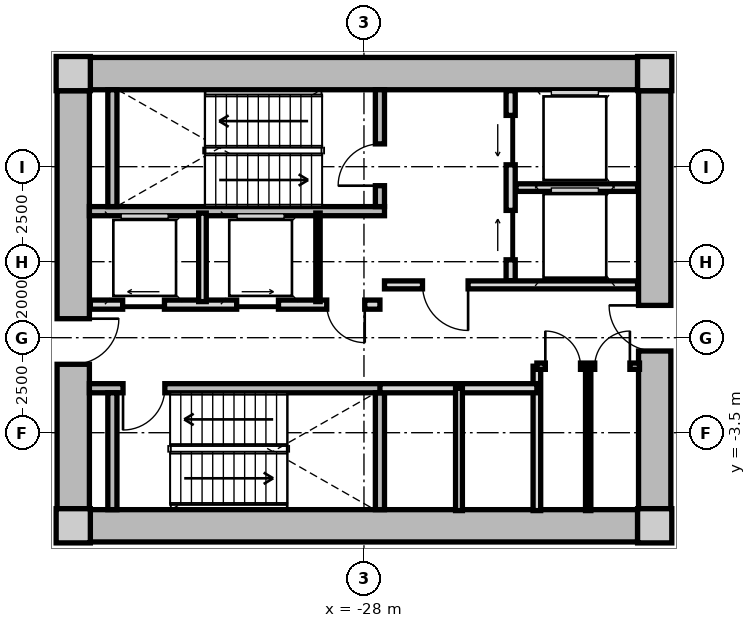
"""IFC4 building model, lengths in metres.
Left out: names, types, materials, properties, quantities, classifications, styles, units other than length and angle.
Written with IfcOpenShell. Run it as: python <this file> out.ifc"""

import sys

from ifc_helpers import new_model, si_unit, direction, frame, frame_2d, origin, origin_2d, place, context, subcontext, project, spatial, rectangle, extrude, source, transform, mapped, element, fill, save


model = new_model("IFC4")
c1 = context("Model", 3, precision=1e-05, world=origin(), true_north=direction((0.0, 1.0)))
c2 = subcontext(c1, "Body", "Model", "MODEL_VIEW")
j1 = project(units=[si_unit("LENGTHUNIT", "METRE"), si_unit("PLANEANGLEUNIT", "RADIAN")], contexts=[c1])
p1 = place(None, origin())
s1 = spatial("IfcSite", under=j1, at=p1, CompositionType="ELEMENT")
p2 = place(p1, origin())
s2 = spatial("IfcBuilding", under=s1, at=p2, CompositionType="ELEMENT")
p3 = place(p2, frame((0.0, 0.0, 8.4)))
s3 = spatial("IfcBuildingStorey", under=s2, at=p3, CompositionType="ELEMENT", Elevation=8.4)
m1 = source(origin(), c2, "Body", "SweptSolid", [
    extrude(rectangle(XDim=0.9, YDim=0.9, at=origin_2d()), origin(), (0.0, 0.0, 1.0), 4.2),
])
for number, where, z_axis, x_axis in (
    (1, (-35.65, -5.95, 0.0), (0.0, 0.0, 1.0), (1.0, 0.0, 0.0)),
    (2, (-20.35, -5.95, 0.0), (0.0, 0.0, 1.0), (1.0, 0.0, 0.0)),
    (3, (-20.35, 5.95, 0.0), (0.0, 0.0, 1.0), (1.0, 0.0, 0.0)),
    (4, (-35.65, 5.95, 0.0), (0.0, 0.0, 1.0), (1.0, 0.0, 0.0)),
):
    element("IfcColumn", number, at=place(p3, frame(where, z_axis=z_axis, x_axis=x_axis)), inside=s3, PredefinedType="COLUMN", context=c2, shape_type="MappedRepresentation", body=[
        mapped(m1, transform((0.0, 0.0, 0.0), x_axis=(1.0, 0.0, 0.0), y_axis=(0.0, 1.0, 0.0), z_axis=(0.0, 0.0, 1.0), scale=1.0)),
    ])
m2 = source(origin(), c2, "Body", "SweptSolid", [
    extrude(rectangle(XDim=14.4, YDim=0.85, at=frame_2d((7.2, 0.0))), origin(), (0.0, 0.0, 1.0), 3.88),
])
for number, where, z_axis, x_axis in (
    (5, (-35.2, 5.95, 0.0), (0.0, 0.0, 1.0), (1.0, 0.0, 0.0)),
    (6, (-20.8, -5.95, 0.0), (0.0, 0.0, 1.0), (-1.0, 0.0, 0.0)),
):
    element("IfcWall", number, at=place(p3, frame(where, z_axis=z_axis, x_axis=x_axis)), inside=s3, PredefinedType="SHEAR", context=c2, shape_type="MappedRepresentation", body=[
        mapped(m2, transform((0.0, 0.0, 0.0), x_axis=(1.0, 0.0, 0.0), y_axis=(0.0, 1.0, 0.0), z_axis=(0.0, 0.0, 1.0), scale=1.0)),
    ])
m3 = source(origin(), c2, "Body", "SweptSolid", [
    extrude(rectangle(XDim=11.0, YDim=0.85, at=frame_2d((5.5, 0.0))), origin(), (0.0, 0.0, 1.0), 3.88),
])
p4 = place(p3, frame((-35.65, -5.5, 0.0), z_axis=(0.0, 0.0, 1.0), x_axis=(0.0, 1.0, 0.0)))
e7 = element("IfcWall", 7, at=p4, inside=s3, PredefinedType="SHEAR", context=c2, shape_type="MappedRepresentation", body=[
    mapped(m3, transform((0.0, 0.0, 0.0), x_axis=(1.0, 0.0, 0.0), y_axis=(0.0, 1.0, 0.0), z_axis=(0.0, 0.0, 1.0), scale=1.0)),
])
p5 = place(p4, frame((3.8, 0.0, 0.0)))
e8 = element("IfcOpeningElement", 8, at=p5, cuts=e7, PredefinedType="OPENING", context=c2, shape_type="SweptSolid", body=[
    extrude(rectangle(XDim=1.2, YDim=2.15, at=frame_2d((0.6, 1.075))), frame((0.0, 0.435, 0.0), z_axis=(0.0, -1.0, 0.0), x_axis=(1.0, 0.0, 0.0)), (0.0, 0.0, 1.0), 0.87),
])
p6 = place(p3, frame((-20.35, 5.5, 0.0), z_axis=(0.0, 0.0, 1.0), x_axis=(0.0, -1.0, 0.0)))
e9 = element("IfcWall", 9, at=p6, inside=s3, PredefinedType="SHEAR", context=c2, shape_type="MappedRepresentation", body=[
    mapped(m3, transform((0.0, 0.0, 0.0), x_axis=(1.0, 0.0, 0.0), y_axis=(0.0, 1.0, 0.0), z_axis=(0.0, 0.0, 1.0), scale=1.0)),
])
p7 = place(p6, frame((5.65, 0.0, 0.0)))
e10 = element("IfcOpeningElement", 10, at=p7, cuts=e9, PredefinedType="OPENING", context=c2, shape_type="SweptSolid", body=[
    extrude(rectangle(XDim=1.2, YDim=2.15, at=frame_2d((0.6, 1.075))), frame((0.0, 0.435, 0.0), z_axis=(0.0, -1.0, 0.0), x_axis=(1.0, 0.0, 0.0)), (0.0, 0.0, 1.0), 0.87),
])
m4 = source(origin(), c2, "Body", "SweptSolid", [
    extrude(rectangle(XDim=7.765, YDim=0.24, at=frame_2d((3.883, 0.0))), origin(), (0.0, 0.0, 1.0), 3.88),
])
p8 = place(p3, frame((-35.225, 2.33, 0.0), z_axis=(0.0, 0.0, 1.0), x_axis=(1.0, 0.0, 0.0)))
e11 = element("IfcWall", 11, at=p8, inside=s3, PredefinedType="PARTITIONING", context=c2, shape_type="MappedRepresentation", body=[
    mapped(m4, transform((0.0, 0.0, 0.0), x_axis=(1.0, 0.0, 0.0), y_axis=(0.0, 1.0, 0.0), z_axis=(0.0, 0.0, 1.0), scale=1.0)),
])
m5 = source(origin(), c2, "Body", "SweptSolid", [
    extrude(rectangle(XDim=3.075, YDim=0.24, at=frame_2d((1.538, 0.0))), origin(), (0.0, 0.0, 1.0), 3.88),
])
p9 = place(p3, frame((-34.62, 2.45, 0.0), z_axis=(0.0, 0.0, 1.0), x_axis=(0.0, 1.0, 0.0)))
e12 = element("IfcWall", 12, at=p9, inside=s3, PredefinedType="PARTITIONING", context=c2, shape_type="MappedRepresentation", body=[
    mapped(m5, transform((0.0, 0.0, 0.0), x_axis=(1.0, 0.0, 0.0), y_axis=(0.0, 1.0, 0.0), z_axis=(0.0, 0.0, 1.0), scale=1.0)),
])
p10 = place(p3, frame((-27.58, 2.45, 0.0), z_axis=(0.0, 0.0, 1.0), x_axis=(0.0, 1.0, 0.0)))
e13 = element("IfcWall", 13, at=p10, inside=s3, PredefinedType="PARTITIONING", context=c2, shape_type="MappedRepresentation", body=[
    mapped(m5, transform((0.0, 0.0, 0.0), x_axis=(1.0, 0.0, 0.0), y_axis=(0.0, 1.0, 0.0), z_axis=(0.0, 0.0, 1.0), scale=1.0)),
])
p11 = place(p10, frame((0.55, 0.0, 0.0)))
e14 = element("IfcOpeningElement", 14, at=p11, cuts=e13, PredefinedType="OPENING", context=c2, shape_type="SweptSolid", body=[
    extrude(rectangle(XDim=1.1, YDim=2.15, at=frame_2d((0.55, 1.075))), frame((0.0, 0.13, 0.0), z_axis=(0.0, -1.0, 0.0), x_axis=(1.0, 0.0, 0.0)), (0.0, 0.0, 1.0), 0.26),
])
p12 = place(p3, frame((-35.225, -2.33, 0.0), z_axis=(0.0, 0.0, 1.0), x_axis=(1.0, 0.0, 0.0)))
e15 = element("IfcWall", 15, at=p12, inside=s3, PredefinedType="PARTITIONING", context=c2, shape_type="MappedRepresentation", body=[
    mapped(m4, transform((0.0, 0.0, 0.0), x_axis=(1.0, 0.0, 0.0), y_axis=(0.0, 1.0, 0.0), z_axis=(0.0, 0.0, 1.0), scale=1.0)),
])
p13 = place(p12, frame((0.885, 0.0, 0.0)))
e16 = element("IfcOpeningElement", 16, at=p13, cuts=e15, PredefinedType="OPENING", context=c2, shape_type="SweptSolid", body=[
    extrude(rectangle(XDim=1.1, YDim=2.15, at=frame_2d((0.55, 1.075))), frame((0.0, 0.13, 0.0), z_axis=(0.0, -1.0, 0.0), x_axis=(1.0, 0.0, 0.0)), (0.0, 0.0, 1.0), 0.26),
])
for number, where, z_axis, x_axis in (
    (17, (-34.62, -5.525, 0.0), (0.0, 0.0, 1.0), (0.0, 1.0, 0.0)),
    (18, (-27.58, -5.525, 0.0), (0.0, 0.0, 1.0), (0.0, 1.0, 0.0)),
):
    element("IfcWall", number, at=place(p3, frame(where, z_axis=z_axis, x_axis=x_axis)), inside=s3, PredefinedType="PARTITIONING", context=c2, shape_type="MappedRepresentation", body=[
        mapped(m5, transform((0.0, 0.0, 0.0), x_axis=(1.0, 0.0, 0.0), y_axis=(0.0, 1.0, 0.0), z_axis=(0.0, 0.0, 1.0), scale=1.0)),
    ])
m6 = source(origin(), c2, "Body", "SweptSolid", [
    extrude(rectangle(XDim=5.0, YDim=0.24, at=frame_2d((2.5, 0.0))), origin(), (0.0, 0.0, 1.0), 3.865),
])
p14 = place(p3, frame((-24.14, 0.5, 0.0), z_axis=(0.0, 0.0, 1.0), x_axis=(0.0, 1.0, 0.0)))
e19 = element("IfcWall", 19, at=p14, inside=s3, PredefinedType="PARTITIONING", context=c2, shape_type="MappedRepresentation", body=[
    mapped(m6, transform((0.0, 0.0, 0.0), x_axis=(1.0, 0.0, 0.0), y_axis=(0.0, 1.0, 0.0), z_axis=(0.0, 0.0, 1.0), scale=1.0)),
])
p15 = place(p14, frame((3.05, 0.0, 0.0)))
e20 = element("IfcOpeningElement", 20, at=p15, cuts=e19, PredefinedType="OPENING", context=c2, shape_type="SweptSolid", body=[
    extrude(rectangle(XDim=1.3, YDim=2.2, at=frame_2d((0.65, 1.1))), frame((0.0, 0.13, 0.0), z_axis=(0.0, -1.0, 0.0), x_axis=(1.0, 0.0, 0.0)), (0.0, 0.0, 1.0), 0.26),
])
p16 = place(p14, frame((0.55, 0.0, 0.0)))
e21 = element("IfcOpeningElement", 21, at=p16, cuts=e19, PredefinedType="OPENING", context=c2, shape_type="SweptSolid", body=[
    extrude(rectangle(XDim=1.3, YDim=2.2, at=frame_2d((0.65, 1.1))), frame((0.0, 0.13, 0.0), z_axis=(0.0, -1.0, 0.0), x_axis=(1.0, 0.0, 0.0)), (0.0, 0.0, 1.0), 0.26),
])
m7 = source(origin(), c2, "Body", "SweptSolid", [
    extrude(rectangle(XDim=3.2, YDim=0.2, at=frame_2d((1.6, 0.0))), origin(), (0.0, 0.0, 1.0), 3.865),
])
p17 = place(p3, frame((-24.0, 2.95, 0.0), z_axis=(0.0, 0.0, 1.0), x_axis=(1.0, 0.0, 0.0)))
e22 = element("IfcWall", 22, at=p17, inside=s3, PredefinedType="PARTITIONING", context=c2, shape_type="MappedRepresentation", body=[
    mapped(m7, transform((0.0, 0.0, 0.0), x_axis=(1.0, 0.0, 0.0), y_axis=(0.0, 1.0, 0.0), z_axis=(0.0, 0.0, 1.0), scale=1.0)),
])
m8 = source(origin(), c2, "Body", "SweptSolid", [
    extrude(rectangle(XDim=6.66, YDim=0.21, at=frame_2d((3.33, 0.0))), origin(), (0.0, 0.0, 1.0), 3.865),
])
p18 = place(p3, frame((-27.46, 0.39, 0.0), z_axis=(0.0, 0.0, 1.0), x_axis=(1.0, 0.0, 0.0)))
e23 = element("IfcWall", 23, at=p18, inside=s3, PredefinedType="PARTITIONING", context=c2, shape_type="MappedRepresentation", body=[
    mapped(m8, transform((0.0, 0.0, 0.0), x_axis=(1.0, 0.0, 0.0), y_axis=(0.0, 1.0, 0.0), z_axis=(0.0, 0.0, 1.0), scale=1.0)),
])
p19 = place(p18, frame((1.0, 0.0, 0.0)))
e24 = element("IfcOpeningElement", 24, at=p19, cuts=e23, PredefinedType="OPENING", context=c2, shape_type="SweptSolid", body=[
    extrude(rectangle(XDim=1.2, YDim=2.15, at=frame_2d((0.6, 1.075))), frame((0.0, 0.115, 0.0), z_axis=(0.0, -1.0, 0.0), x_axis=(1.0, 0.0, 0.0)), (0.0, 0.0, 1.0), 0.23),
])
m9 = source(origin(), c2, "Body", "SweptSolid", [
    extrude(rectangle(XDim=7.62, YDim=0.24, at=frame_2d((3.81, 0.0))), origin(), (0.0, 0.0, 1.0), 3.865),
])
p20 = place(p3, frame((-35.2, -0.13, 0.0), z_axis=(0.0, 0.0, 1.0), x_axis=(1.0, 0.0, 0.0)))
e25 = element("IfcWall", 25, at=p20, inside=s3, PredefinedType="PARTITIONING", context=c2, shape_type="MappedRepresentation", body=[
    mapped(m9, transform((0.0, 0.0, 0.0), x_axis=(1.0, 0.0, 0.0), y_axis=(0.0, 1.0, 0.0), z_axis=(0.0, 0.0, 1.0), scale=1.0)),
])
p21 = place(p20, frame((6.22, 0.0, 0.0)))
e26 = element("IfcOpeningElement", 26, at=p21, cuts=e25, PredefinedType="OPENING", context=c2, shape_type="SweptSolid", body=[
    extrude(rectangle(XDim=1.0, YDim=2.1, at=frame_2d((0.5, 1.05))), frame((0.0, 0.13, 0.0), z_axis=(0.0, -1.0, 0.0), x_axis=(1.0, 0.0, 0.0)), (0.0, 0.0, 1.0), 0.26),
])
p22 = place(p20, frame((0.85, 0.0, 0.0)))
e27 = element("IfcOpeningElement", 27, at=p22, cuts=e25, PredefinedType="OPENING", context=c2, shape_type="SweptSolid", body=[
    extrude(rectangle(XDim=1.1, YDim=2.2, at=frame_2d((0.55, 1.1))), frame((0.0, 0.13, 0.0), z_axis=(0.0, -1.0, 0.0), x_axis=(1.0, 0.0, 0.0)), (0.0, 0.0, 1.0), 0.26),
])
p23 = place(p20, frame((3.85, 0.0, 0.0)))
e28 = element("IfcOpeningElement", 28, at=p23, cuts=e25, PredefinedType="OPENING", context=c2, shape_type="SweptSolid", body=[
    extrude(rectangle(XDim=1.1, YDim=2.2, at=frame_2d((0.55, 1.1))), frame((0.0, 0.13, 0.0), z_axis=(0.0, -1.0, 0.0), x_axis=(1.0, 0.0, 0.0)), (0.0, 0.0, 1.0), 0.26),
])
m10 = source(origin(), c2, "Body", "SweptSolid", [
    extrude(rectangle(XDim=2.33, YDim=0.115, at=frame_2d((1.165, 0.0))), origin(), (0.0, 0.0, 1.0), 3.865),
])
p24 = place(p3, frame((-29.21, -0.05, 0.0), z_axis=(0.0, 0.0, 1.0), x_axis=(0.0, 1.0, 0.0)))
e29 = element("IfcWall", 29, at=p24, inside=s3, PredefinedType="PARTITIONING", context=c2, shape_type="MappedRepresentation", body=[
    mapped(m10, transform((0.0, 0.0, 0.0), x_axis=(1.0, 0.0, 0.0), y_axis=(0.0, 1.0, 0.0), z_axis=(0.0, 0.0, 1.0), scale=1.0)),
])
m11 = source(origin(), c2, "Body", "SweptSolid", [
    extrude(rectangle(XDim=2.33, YDim=0.2, at=frame_2d((1.165, 0.0))), origin(), (0.0, 0.0, 1.0), 3.865),
])
p25 = place(p3, frame((-32.25, -0.05, 0.0), z_axis=(0.0, 0.0, 1.0), x_axis=(0.0, 1.0, 0.0)))
e30 = element("IfcWall", 30, at=p25, inside=s3, PredefinedType="PARTITIONING", context=c2, shape_type="MappedRepresentation", body=[
    mapped(m11, transform((0.0, 0.0, 0.0), x_axis=(1.0, 0.0, 0.0), y_axis=(0.0, 1.0, 0.0), z_axis=(0.0, 0.0, 1.0), scale=1.0)),
])
m12 = source(origin(), c2, "Body", "SweptSolid", [
    extrude(rectangle(XDim=3.8, YDim=0.2, at=frame_2d((1.9, 0.0))), origin(), (0.0, 0.0, 1.0), 3.865),
])
p26 = place(p3, frame((-23.45, -5.55, 0.0), z_axis=(0.0, 0.0, 1.0), x_axis=(0.0, 1.0, 0.0)))
e31 = element("IfcWall", 31, at=p26, inside=s3, PredefinedType="PARTITIONING", context=c2, shape_type="MappedRepresentation", body=[
    mapped(m12, transform((0.0, 0.0, 0.0), x_axis=(1.0, 0.0, 0.0), y_axis=(0.0, 1.0, 0.0), z_axis=(0.0, 0.0, 1.0), scale=1.0)),
])
m13 = source(origin(), c2, "Body", "SweptSolid", [
    extrude(rectangle(XDim=4.13, YDim=0.24, at=frame_2d((2.065, 0.0))), origin(), (0.0, 0.0, 1.0), 3.865),
])
p27 = place(p3, frame((-27.58, -2.33, 0.0), z_axis=(0.0, 0.0, 1.0), x_axis=(1.0, 0.0, 0.0)))
e32 = element("IfcWall", 32, at=p27, inside=s3, PredefinedType="PARTITIONING", context=c2, shape_type="MappedRepresentation", body=[
    mapped(m13, transform((0.0, 0.0, 0.0), x_axis=(1.0, 0.0, 0.0), y_axis=(0.0, 1.0, 0.0), z_axis=(0.0, 0.0, 1.0), scale=1.0)),
])
m14 = source(origin(), c2, "Body", "SweptSolid", [
    extrude(rectangle(XDim=3.22, YDim=0.18, at=frame_2d((1.61, 0.0))), origin(), (0.0, 0.0, 1.0), 3.865),
])
p28 = place(p3, frame((-25.5, -5.55, 0.0), z_axis=(0.0, 0.0, 1.0), x_axis=(0.0, 1.0, 0.0)))
e33 = element("IfcWall", 33, at=p28, inside=s3, PredefinedType="PARTITIONING", context=c2, shape_type="MappedRepresentation", body=[
    mapped(m14, transform((0.0, 0.0, 0.0), x_axis=(1.0, 0.0, 0.0), y_axis=(0.0, 1.0, 0.0), z_axis=(0.0, 0.0, 1.0), scale=1.0)),
])
m15 = source(origin(), c2, "Body", "SweptSolid", [
    extrude(rectangle(XDim=2.7, YDim=0.165, at=frame_2d((1.35, 0.0))), origin(), (0.0, 0.0, 1.0), 3.865),
])
p29 = place(p3, frame((-23.45, -1.75, 0.0), z_axis=(0.0, 0.0, 1.0), x_axis=(1.0, 0.0, 0.0)))
e34 = element("IfcWall", 34, at=p29, inside=s3, PredefinedType="PARTITIONING", context=c2, shape_type="MappedRepresentation", body=[
    mapped(m15, transform((0.0, 0.0, 0.0), x_axis=(1.0, 0.0, 0.0), y_axis=(0.0, 1.0, 0.0), z_axis=(0.0, 0.0, 1.0), scale=1.0)),
])
p30 = place(p29, frame((0.222, 0.0, 0.0)))
e35 = element("IfcOpeningElement", 35, at=p30, cuts=e34, PredefinedType="OPENING", context=c2, shape_type="SweptSolid", body=[
    extrude(rectangle(XDim=0.925, YDim=2.1, at=frame_2d((0.462, 1.05))), frame((0.0, 0.093, 0.0), z_axis=(0.0, -1.0, 0.0), x_axis=(1.0, 0.0, 0.0)), (0.0, 0.0, 1.0), 0.185),
])
p31 = place(p29, frame((1.522, 0.0, 0.0)))
e36 = element("IfcOpeningElement", 36, at=p31, cuts=e34, PredefinedType="OPENING", context=c2, shape_type="SweptSolid", body=[
    extrude(rectangle(XDim=0.925, YDim=2.1, at=frame_2d((0.462, 1.05))), frame((0.0, 0.093, 0.0), z_axis=(0.0, -1.0, 0.0), x_axis=(1.0, 0.0, 0.0)), (0.0, 0.0, 1.0), 0.185),
])
m16 = source(origin(), c2, "Body", "SweptSolid", [
    extrude(rectangle(XDim=3.8, YDim=0.14, at=frame_2d((1.9, 0.0))), origin(), (0.0, 0.0, 1.0), 3.865),
])
p32 = place(p3, frame((-22.1, -5.55, 0.0), z_axis=(0.0, 0.0, 1.0), x_axis=(0.0, 1.0, 0.0)))
e37 = element("IfcWall", 37, at=p32, inside=s3, PredefinedType="PARTITIONING", context=c2, shape_type="MappedRepresentation", body=[
    mapped(m16, transform((0.0, 0.0, 0.0), x_axis=(1.0, 0.0, 0.0), y_axis=(0.0, 1.0, 0.0), z_axis=(0.0, 0.0, 1.0), scale=1.0)),
])
m17 = source(origin(), c2, "Body", "SweptSolid", [
    extrude(rectangle(XDim=1.1, YDim=2.15, at=frame_2d((0.55, 1.075))), frame((0.0, 0.025, 0.0), z_axis=(0.0, -1.0, 0.0), x_axis=(1.0, 0.0, 0.0)), (0.0, 0.0, 1.0), 0.05),
])
p33 = place(p11, origin())
e38 = element("IfcDoor", 38, at=p33, inside=s3, OperationType="SINGLE_SWING_LEFT", PredefinedType="DOOR", context=c2, shape_type="MappedRepresentation", body=[
    mapped(m17, transform((0.0, 0.0, 0.0), x_axis=(1.0, 0.0, 0.0), y_axis=(0.0, 1.0, 0.0), z_axis=(0.0, 0.0, 1.0), scale=1.0)),
])
fill(e14, e38)
p34 = place(p13, frame((1.1, 0.0, 0.0), z_axis=(0.0, 0.0, 1.0), x_axis=(-1.0, 0.0, 0.0)))
e39 = element("IfcDoor", 39, at=p34, inside=s3, OperationType="SINGLE_SWING_RIGHT", PredefinedType="DOOR", context=c2, shape_type="MappedRepresentation", body=[
    mapped(m17, transform((0.0, 0.0, 0.0), x_axis=(1.0, 0.0, 0.0), y_axis=(0.0, 1.0, 0.0), z_axis=(0.0, 0.0, 1.0), scale=1.0)),
])
fill(e16, e39)
m18 = source(origin(), c2, "Body", "SweptSolid", [
    extrude(rectangle(XDim=1.3, YDim=2.2, at=frame_2d((0.65, 1.1))), frame((0.0, 0.025, 0.0), z_axis=(0.0, -1.0, 0.0), x_axis=(1.0, 0.0, 0.0)), (0.0, 0.0, 1.0), 0.05),
])
p35 = place(p15, origin())
e40 = element("IfcDoor", 40, at=p35, inside=s3, OperationType="SLIDING_TO_LEFT", PredefinedType="DOOR", context=c2, shape_type="MappedRepresentation", body=[
    mapped(m18, transform((0.0, 0.0, 0.0), x_axis=(1.0, 0.0, 0.0), y_axis=(0.0, 1.0, 0.0), z_axis=(0.0, 0.0, 1.0), scale=1.0)),
])
fill(e20, e40)
p36 = place(p16, origin())
e41 = element("IfcDoor", 41, at=p36, inside=s3, OperationType="SLIDING_TO_RIGHT", PredefinedType="DOOR", context=c2, shape_type="MappedRepresentation", body=[
    mapped(m18, transform((0.0, 0.0, 0.0), x_axis=(1.0, 0.0, 0.0), y_axis=(0.0, 1.0, 0.0), z_axis=(0.0, 0.0, 1.0), scale=1.0)),
])
fill(e21, e41)
m19 = source(origin(), c2, "Body", "SweptSolid", [
    extrude(rectangle(XDim=1.2, YDim=2.15, at=frame_2d((0.6, 1.075))), frame((0.0, 0.025, 0.0), z_axis=(0.0, -1.0, 0.0), x_axis=(1.0, 0.0, 0.0)), (0.0, 0.0, 1.0), 0.05),
])
p37 = place(p19, frame((1.2, 0.0, 0.0), z_axis=(0.0, 0.0, 1.0), x_axis=(-1.0, 0.0, 0.0)))
e42 = element("IfcDoor", 42, at=p37, inside=s3, OperationType="SINGLE_SWING_LEFT", PredefinedType="DOOR", context=c2, shape_type="MappedRepresentation", body=[
    mapped(m19, transform((0.0, 0.0, 0.0), x_axis=(1.0, 0.0, 0.0), y_axis=(0.0, 1.0, 0.0), z_axis=(0.0, 0.0, 1.0), scale=1.0)),
])
fill(e24, e42)
p38 = place(p5, frame((1.2, 0.0, 0.0), z_axis=(0.0, 0.0, 1.0), x_axis=(-1.0, 0.0, 0.0)))
e43 = element("IfcDoor", 43, at=p38, inside=s3, OperationType="SINGLE_SWING_LEFT", PredefinedType="DOOR", context=c2, shape_type="MappedRepresentation", body=[
    mapped(m19, transform((0.0, 0.0, 0.0), x_axis=(1.0, 0.0, 0.0), y_axis=(0.0, 1.0, 0.0), z_axis=(0.0, 0.0, 1.0), scale=1.0)),
])
fill(e8, e43)
p39 = place(p7, frame((1.2, 0.0, 0.0), z_axis=(0.0, 0.0, 1.0), x_axis=(-1.0, 0.0, 0.0)))
e44 = element("IfcDoor", 44, at=p39, inside=s3, OperationType="SINGLE_SWING_RIGHT", PredefinedType="DOOR", context=c2, shape_type="MappedRepresentation", body=[
    mapped(m19, transform((0.0, 0.0, 0.0), x_axis=(1.0, 0.0, 0.0), y_axis=(0.0, 1.0, 0.0), z_axis=(0.0, 0.0, 1.0), scale=1.0)),
])
fill(e10, e44)
m20 = source(origin(), c2, "Body", "SweptSolid", [
    extrude(rectangle(XDim=1.0, YDim=2.1, at=frame_2d((0.5, 1.05))), frame((0.0, 0.025, 0.0), z_axis=(0.0, -1.0, 0.0), x_axis=(1.0, 0.0, 0.0)), (0.0, 0.0, 1.0), 0.05),
])
p40 = place(p21, frame((1.0, 0.0, 0.0), z_axis=(0.0, 0.0, 1.0), x_axis=(-1.0, 0.0, 0.0)))
e45 = element("IfcDoor", 45, at=p40, inside=s3, OperationType="SINGLE_SWING_LEFT", PredefinedType="DOOR", context=c2, shape_type="MappedRepresentation", body=[
    mapped(m20, transform((0.0, 0.0, 0.0), x_axis=(1.0, 0.0, 0.0), y_axis=(0.0, 1.0, 0.0), z_axis=(0.0, 0.0, 1.0), scale=1.0)),
])
fill(e26, e45)
m21 = source(origin(), c2, "Body", "SweptSolid", [
    extrude(rectangle(XDim=1.1, YDim=2.2, at=frame_2d((0.55, 1.1))), frame((0.0, 0.025, 0.0), z_axis=(0.0, -1.0, 0.0), x_axis=(1.0, 0.0, 0.0)), (0.0, 0.0, 1.0), 0.05),
])
p41 = place(p22, origin())
e46 = element("IfcDoor", 46, at=p41, inside=s3, OperationType="SLIDING_TO_LEFT", PredefinedType="DOOR", context=c2, shape_type="MappedRepresentation", body=[
    mapped(m21, transform((0.0, 0.0, 0.0), x_axis=(1.0, 0.0, 0.0), y_axis=(0.0, 1.0, 0.0), z_axis=(0.0, 0.0, 1.0), scale=1.0)),
])
fill(e27, e46)
p42 = place(p23, origin())
e47 = element("IfcDoor", 47, at=p42, inside=s3, OperationType="SLIDING_TO_RIGHT", PredefinedType="DOOR", context=c2, shape_type="MappedRepresentation", body=[
    mapped(m21, transform((0.0, 0.0, 0.0), x_axis=(1.0, 0.0, 0.0), y_axis=(0.0, 1.0, 0.0), z_axis=(0.0, 0.0, 1.0), scale=1.0)),
])
fill(e28, e47)
m22 = source(origin(), c2, "Body", "SweptSolid", [
    extrude(rectangle(XDim=0.925, YDim=2.1, at=frame_2d((0.462, 1.05))), frame((0.0, 0.025, 0.0), z_axis=(0.0, -1.0, 0.0), x_axis=(1.0, 0.0, 0.0)), (0.0, 0.0, 1.0), 0.05),
])
p43 = place(p30, origin())
e48 = element("IfcDoor", 48, at=p43, inside=s3, OperationType="SINGLE_SWING_LEFT", PredefinedType="DOOR", context=c2, shape_type="MappedRepresentation", body=[
    mapped(m22, transform((0.0, 0.0, 0.0), x_axis=(1.0, 0.0, 0.0), y_axis=(0.0, 1.0, 0.0), z_axis=(0.0, 0.0, 1.0), scale=1.0)),
])
fill(e35, e48)
p44 = place(p31, origin())
e49 = element("IfcDoor", 49, at=p44, inside=s3, OperationType="SINGLE_SWING_RIGHT", PredefinedType="DOOR", context=c2, shape_type="MappedRepresentation", body=[
    mapped(m22, transform((0.0, 0.0, 0.0), x_axis=(1.0, 0.0, 0.0), y_axis=(0.0, 1.0, 0.0), z_axis=(0.0, 0.0, 1.0), scale=1.0)),
])
fill(e36, e49)
save(model, sys.argv[1])
